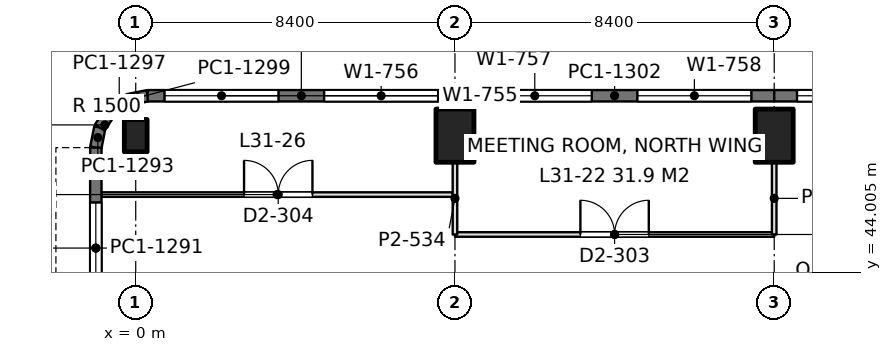
"""IFC4 building model, lengths in metres.
Left out: names, types, materials, properties, quantities, classifications, styles, units other than length and angle.
Written with IfcOpenShell. Run it as: python <this file> out.ifc"""

import sys

from ifc_helpers import new_model, si_unit, direction, frame, frame_2d, origin, origin_2d, place, context, subcontext, project, spatial, rectangle, extrude, element, fill, save


model = new_model("IFC4")
c1 = context("Model", 3, precision=1e-05, world=origin(), true_north=direction((0.0, 1.0)))
c2 = subcontext(c1, "Body", "Model", "MODEL_VIEW")
j1 = project(units=[si_unit("LENGTHUNIT", "METRE"), si_unit("PLANEANGLEUNIT", "RADIAN")], contexts=[c1])
p1 = place(None, origin())
s1 = spatial("IfcSite", under=j1, at=p1, CompositionType="ELEMENT")
p2 = place(p1, origin())
s2 = spatial("IfcBuilding", under=s1, at=p2, CompositionType="ELEMENT")
p3 = place(p2, frame((0.0, 0.0, 138.6)))
s3 = spatial("IfcBuildingStorey", under=s2, at=p3, CompositionType="ELEMENT", Elevation=138.6)
p4 = place(p3, frame((0.0, 47.6, 0.0), z_axis=(0.0, 0.0, 1.0), x_axis=(1.0, 0.0, 0.0)))
e1 = element("IfcColumn", 1, at=p4, inside=s3, PredefinedType="COLUMN", context=c2, shape_type="SweptSolid", body=[
    extrude(rectangle(XDim=0.6, YDim=0.85, at=origin_2d()), origin(), (0.0, 0.0, 1.0), 4.2),
])
for number, where, z_axis, x_axis in (
    (2, (8.4, 47.6, 0.0), (0.0, 0.0, 1.0), (1.0, 0.0, 0.0)),
    (3, (16.8, 47.6, 0.0), (0.0, 0.0, 1.0), (1.0, 0.0, 0.0)),
):
    element("IfcColumn", number, at=place(p3, frame(where, z_axis=z_axis, x_axis=x_axis)), inside=s3, PredefinedType="COLUMN", context=c2, shape_type="SweptSolid", body=[
        extrude(rectangle(XDim=1.0, YDim=1.4, at=origin_2d()), origin(), (0.0, 0.0, 1.0), 4.2),
    ])
p5 = place(p3, frame((-1.05, 42.0, 0.0), z_axis=(0.0, 0.0, 1.0), x_axis=(0.0, 1.0, 0.0)))
e4 = element("IfcWall", 4, at=p5, inside=s3, PredefinedType="SOLIDWALL", context=c2, shape_type="SweptSolid", body=[
    extrude(rectangle(XDim=5.285, YDim=0.3, at=frame_2d((2.643, 0.0))), origin(), (0.0, 0.0, 1.0), 4.05),
])
p6 = place(p5, frame((1.443, 0.0, 0.9)))
e5 = element("IfcOpeningElement", 5, at=p6, cuts=e4, PredefinedType="OPENING", context=c2, shape_type="SweptSolid", body=[
    extrude(rectangle(XDim=2.4, YDim=1.9, at=frame_2d((1.2, 0.95))), frame((0.0, 0.16, 0.0), z_axis=(0.0, -1.0, 0.0), x_axis=(1.0, 0.0, 0.0)), (0.0, 0.0, 1.0), 0.32),
])
p7 = place(p3, frame((-1.05, 47.285, 0.0), z_axis=(0.0, 0.0, 1.0), x_axis=(0.195073962632, 0.980788534345, 0.0)))
e6 = element("IfcWall", 6, at=p7, inside=s3, PredefinedType="SOLIDWALL", context=c2, shape_type="SweptSolid", body=[
    extrude(rectangle(XDim=0.541, YDim=0.3, at=frame_2d((0.271, 0.0))), origin(), (0.0, 0.0, 1.0), 4.05),
])
p8 = place(p3, frame((-0.945, 47.815, 0.0), z_axis=(0.0, 0.0, 1.0), x_axis=(0.55534295404, 0.831621430339, 0.0)))
e7 = element("IfcWall", 7, at=p8, inside=s3, PredefinedType="SOLIDWALL", context=c2, shape_type="SweptSolid", body=[
    extrude(rectangle(XDim=0.526, YDim=0.3, at=frame_2d((0.263, 0.0))), origin(), (0.0, 0.0, 1.0), 4.05),
])
p9 = place(p3, frame((-0.653, 48.253, 0.0), z_axis=(0.0, 0.0, 1.0), x_axis=(0.831692711774, 0.555236195849, 0.0)))
e8 = element("IfcWall", 8, at=p9, inside=s3, PredefinedType="SOLIDWALL", context=c2, shape_type="SweptSolid", body=[
    extrude(rectangle(XDim=0.525, YDim=0.3, at=frame_2d((0.263, 0.0))), origin(), (0.0, 0.0, 1.0), 4.05),
])
p10 = place(p3, frame((-0.216, 48.544, 0.0), z_axis=(0.0, 0.0, 1.0), x_axis=(0.980788534345, 0.195073962632, 0.0)))
e9 = element("IfcWall", 9, at=p10, inside=s3, PredefinedType="SOLIDWALL", context=c2, shape_type="SweptSolid", body=[
    extrude(rectangle(XDim=0.541, YDim=0.3, at=frame_2d((0.271, 0.0))), origin(), (0.0, 0.0, 1.0), 4.05),
])
p11 = place(p3, frame((0.315, 48.65, 0.0), z_axis=(0.0, 0.0, 1.0), x_axis=(1.0, 0.0, 0.0)))
e10 = element("IfcWall", 10, at=p11, inside=s3, PredefinedType="SOLIDWALL", context=c2, shape_type="SweptSolid", body=[
    extrude(rectangle(XDim=8.085, YDim=0.3, at=frame_2d((4.042, 0.0))), origin(), (0.0, 0.0, 1.0), 4.05),
])
p12 = place(p11, frame((0.443, 0.0, 0.9)))
e11 = element("IfcOpeningElement", 11, at=p12, cuts=e10, PredefinedType="OPENING", context=c2, shape_type="SweptSolid", body=[
    extrude(rectangle(XDim=3.0, YDim=1.9, at=frame_2d((1.5, 0.95))), frame((0.0, 0.16, 0.0), z_axis=(0.0, -1.0, 0.0), x_axis=(1.0, 0.0, 0.0)), (0.0, 0.0, 1.0), 0.32),
])
p13 = place(p11, frame((4.643, 0.0, 0.9)))
e12 = element("IfcOpeningElement", 12, at=p13, cuts=e10, PredefinedType="OPENING", context=c2, shape_type="SweptSolid", body=[
    extrude(rectangle(XDim=3.0, YDim=1.9, at=frame_2d((1.5, 0.95))), frame((0.0, 0.16, 0.0), z_axis=(0.0, -1.0, 0.0), x_axis=(1.0, 0.0, 0.0)), (0.0, 0.0, 1.0), 0.32),
])
p14 = place(p3, frame((8.4, 48.65, 0.0), z_axis=(0.0, 0.0, 1.0), x_axis=(1.0, 0.0, 0.0)))
e13 = element("IfcWall", 13, at=p14, inside=s3, PredefinedType="SOLIDWALL", context=c2, shape_type="SweptSolid", body=[
    extrude(rectangle(XDim=8.4, YDim=0.3, at=frame_2d((4.2, 0.0))), origin(), (0.0, 0.0, 1.0), 4.05),
])
p15 = place(p14, frame((0.6, 0.0, 0.9)))
e14 = element("IfcOpeningElement", 14, at=p15, cuts=e13, PredefinedType="OPENING", context=c2, shape_type="SweptSolid", body=[
    extrude(rectangle(XDim=3.0, YDim=1.9, at=frame_2d((1.5, 0.95))), frame((0.0, 0.16, 0.0), z_axis=(0.0, -1.0, 0.0), x_axis=(1.0, 0.0, 0.0)), (0.0, 0.0, 1.0), 0.32),
])
p16 = place(p14, frame((4.8, 0.0, 0.9)))
e15 = element("IfcOpeningElement", 15, at=p16, cuts=e13, PredefinedType="OPENING", context=c2, shape_type="SweptSolid", body=[
    extrude(rectangle(XDim=3.0, YDim=1.9, at=frame_2d((1.5, 0.95))), frame((0.0, 0.16, 0.0), z_axis=(0.0, -1.0, 0.0), x_axis=(1.0, 0.0, 0.0)), (0.0, 0.0, 1.0), 0.32),
])
p17 = place(p3, frame((16.8, 48.65, 0.0), z_axis=(0.0, 0.0, 1.0), x_axis=(1.0, 0.0, 0.0)))
e16 = element("IfcWall", 16, at=p17, inside=s3, PredefinedType="SOLIDWALL", context=c2, shape_type="SweptSolid", body=[
    extrude(rectangle(XDim=8.4, YDim=0.3, at=frame_2d((4.2, 0.0))), origin(), (0.0, 0.0, 1.0), 4.05),
])
p18 = place(p17, frame((0.6, 0.0, 0.9)))
e17 = element("IfcOpeningElement", 17, at=p18, cuts=e16, PredefinedType="OPENING", context=c2, shape_type="SweptSolid", body=[
    extrude(rectangle(XDim=3.0, YDim=1.9, at=frame_2d((1.5, 0.95))), frame((0.0, 0.16, 0.0), z_axis=(0.0, -1.0, 0.0), x_axis=(1.0, 0.0, 0.0)), (0.0, 0.0, 1.0), 0.32),
])
p19 = place(p17, frame((4.8, 0.0, 0.9)))
e18 = element("IfcOpeningElement", 18, at=p19, cuts=e16, PredefinedType="OPENING", context=c2, shape_type="SweptSolid", body=[
    extrude(rectangle(XDim=3.0, YDim=1.9, at=frame_2d((1.5, 0.95))), frame((0.0, 0.16, 0.0), z_axis=(0.0, -1.0, 0.0), x_axis=(1.0, 0.0, 0.0)), (0.0, 0.0, 1.0), 0.32),
])
p20 = place(p3, frame((-0.902, 46.05, 0.0), z_axis=(0.0, 0.0, 1.0), x_axis=(1.0, 0.0, 0.0)))
e19 = element("IfcWall", 19, at=p20, inside=s3, PredefinedType="PARTITIONING", context=c2, shape_type="SweptSolid", body=[
    extrude(rectangle(XDim=9.244, YDim=0.12, at=frame_2d((4.622, 0.0))), origin(), (0.0, 0.0, 1.0), 3.55),
])
p21 = place(p20, frame((3.752, 0.0, 0.0)))
e20 = element("IfcOpeningElement", 20, at=p21, cuts=e19, PredefinedType="OPENING", context=c2, shape_type="SweptSolid", body=[
    extrude(rectangle(XDim=1.8, YDim=2.2, at=frame_2d((0.9, 1.1))), frame((0.0, 0.07, 0.0), z_axis=(0.0, -1.0, 0.0), x_axis=(1.0, 0.0, 0.0)), (0.0, 0.0, 1.0), 0.14),
])
p22 = place(p3, frame((8.4, 45.0, 0.0), z_axis=(0.0, 0.0, 1.0), x_axis=(1.0, 0.0, 0.0)))
e21 = element("IfcWall", 21, at=p22, inside=s3, PredefinedType="PARTITIONING", context=c2, shape_type="SweptSolid", body=[
    extrude(rectangle(XDim=8.4, YDim=0.12, at=frame_2d((4.2, 0.0))), origin(), (0.0, 0.0, 1.0), 3.55),
])
p23 = place(p22, frame((3.3, 0.0, 0.0)))
e22 = element("IfcOpeningElement", 22, at=p23, cuts=e21, PredefinedType="OPENING", context=c2, shape_type="SweptSolid", body=[
    extrude(rectangle(XDim=1.8, YDim=2.2, at=frame_2d((0.9, 1.1))), frame((0.0, 0.07, 0.0), z_axis=(0.0, -1.0, 0.0), x_axis=(1.0, 0.0, 0.0)), (0.0, 0.0, 1.0), 0.14),
])
for number, where, z_axis, x_axis in (
    (23, (8.4, 45.0, 0.0), (0.0, 0.0, 1.0), (0.0, 1.0, 0.0)),
    (24, (16.8, 45.0, 0.0), (0.0, 0.0, 1.0), (0.0, 1.0, 0.0)),
):
    element("IfcWall", number, at=place(p3, frame(where, z_axis=z_axis, x_axis=x_axis)), inside=s3, PredefinedType="PARTITIONING", context=c2, shape_type="SweptSolid", body=[
        extrude(rectangle(XDim=1.901, YDim=0.12, at=frame_2d((0.95, 0.0))), origin(), (0.0, 0.0, 1.0), 3.55),
    ])
p24 = place(p6, origin())
e25 = element("IfcWindow", 25, at=p24, inside=s3, PartitioningType="SINGLE_PANEL", PredefinedType="WINDOW", context=c2, shape_type="SweptSolid", body=[
    extrude(rectangle(XDim=2.4, YDim=1.9, at=frame_2d((1.2, 0.95))), frame((0.0, 0.03, 0.0), z_axis=(0.0, -1.0, 0.0), x_axis=(1.0, 0.0, 0.0)), (0.0, 0.0, 1.0), 0.06),
])
fill(e5, e25)
p25 = place(p12, origin())
e26 = element("IfcWindow", 26, at=p25, inside=s3, PartitioningType="SINGLE_PANEL", PredefinedType="WINDOW", context=c2, shape_type="SweptSolid", body=[
    extrude(rectangle(XDim=3.0, YDim=1.9, at=frame_2d((1.5, 0.95))), frame((0.0, 0.03, 0.0), z_axis=(0.0, -1.0, 0.0), x_axis=(1.0, 0.0, 0.0)), (0.0, 0.0, 1.0), 0.06),
])
fill(e11, e26)
p26 = place(p13, origin())
e27 = element("IfcWindow", 27, at=p26, inside=s3, PartitioningType="SINGLE_PANEL", PredefinedType="WINDOW", context=c2, shape_type="SweptSolid", body=[
    extrude(rectangle(XDim=3.0, YDim=1.9, at=frame_2d((1.5, 0.95))), frame((0.0, 0.03, 0.0), z_axis=(0.0, -1.0, 0.0), x_axis=(1.0, 0.0, 0.0)), (0.0, 0.0, 1.0), 0.06),
])
fill(e12, e27)
p27 = place(p15, origin())
e28 = element("IfcWindow", 28, at=p27, inside=s3, PartitioningType="SINGLE_PANEL", PredefinedType="WINDOW", context=c2, shape_type="SweptSolid", body=[
    extrude(rectangle(XDim=3.0, YDim=1.9, at=frame_2d((1.5, 0.95))), frame((0.0, 0.03, 0.0), z_axis=(0.0, -1.0, 0.0), x_axis=(1.0, 0.0, 0.0)), (0.0, 0.0, 1.0), 0.06),
])
fill(e14, e28)
p28 = place(p16, origin())
e29 = element("IfcWindow", 29, at=p28, inside=s3, PartitioningType="SINGLE_PANEL", PredefinedType="WINDOW", context=c2, shape_type="SweptSolid", body=[
    extrude(rectangle(XDim=3.0, YDim=1.9, at=frame_2d((1.5, 0.95))), frame((0.0, 0.03, 0.0), z_axis=(0.0, -1.0, 0.0), x_axis=(1.0, 0.0, 0.0)), (0.0, 0.0, 1.0), 0.06),
])
fill(e15, e29)
p29 = place(p18, origin())
e30 = element("IfcWindow", 30, at=p29, inside=s3, PartitioningType="SINGLE_PANEL", PredefinedType="WINDOW", context=c2, shape_type="SweptSolid", body=[
    extrude(rectangle(XDim=3.0, YDim=1.9, at=frame_2d((1.5, 0.95))), frame((0.0, 0.03, 0.0), z_axis=(0.0, -1.0, 0.0), x_axis=(1.0, 0.0, 0.0)), (0.0, 0.0, 1.0), 0.06),
])
fill(e17, e30)
p30 = place(p21, origin())
e31 = element("IfcDoor", 31, at=p30, inside=s3, OperationType="DOUBLE_DOOR_SINGLE_SWING", PredefinedType="DOOR", context=c2, shape_type="SweptSolid", body=[
    extrude(rectangle(XDim=1.8, YDim=2.2, at=frame_2d((0.9, 1.1))), frame((0.0, 0.025, 0.0), z_axis=(0.0, -1.0, 0.0), x_axis=(1.0, 0.0, 0.0)), (0.0, 0.0, 1.0), 0.05),
])
fill(e20, e31)
p31 = place(p23, origin())
e32 = element("IfcDoor", 32, at=p31, inside=s3, OperationType="DOUBLE_DOOR_SINGLE_SWING", PredefinedType="DOOR", context=c2, shape_type="SweptSolid", body=[
    extrude(rectangle(XDim=1.8, YDim=2.2, at=frame_2d((0.9, 1.1))), frame((0.0, 0.025, 0.0), z_axis=(0.0, -1.0, 0.0), x_axis=(1.0, 0.0, 0.0)), (0.0, 0.0, 1.0), 0.05),
])
fill(e22, e32)
save(model, sys.argv[1])
